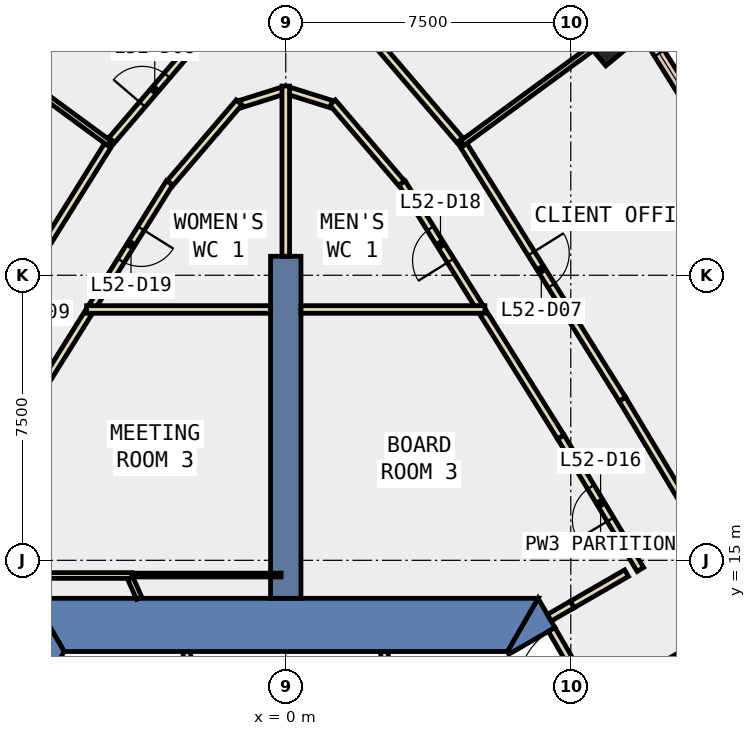
"""IFC4 building model, lengths in metres.
Left out: names, types, materials, properties, quantities, classifications, styles, units other than length and angle.
Written with IfcOpenShell. Run it as: python <this file> out.ifc"""

import sys

from ifc_helpers import new_model, si_unit, direction, frame, frame_2d, origin, origin_2d, place, context, subcontext, project, spatial, polyline, rectangle, outline, extrude, element, fill, save


model = new_model("IFC4")
c1 = context("Model", 3, precision=1e-05, world=origin(), true_north=direction((0.0, 1.0)))
c2 = subcontext(c1, "Body", "Model", "MODEL_VIEW")
j1 = project(units=[si_unit("LENGTHUNIT", "METRE"), si_unit("PLANEANGLEUNIT", "RADIAN")], contexts=[c1])
p1 = place(None, origin())
s1 = spatial("IfcSite", under=j1, at=p1, CompositionType="ELEMENT")
p2 = place(p1, origin())
s2 = spatial("IfcBuilding", under=s1, at=p2, CompositionType="ELEMENT")
p3 = place(p2, frame((0.0, 0.0, 231.8)))
s3 = spatial("IfcBuildingStorey", under=s2, at=p3, CompositionType="ELEMENT", Elevation=231.8)
p4 = place(p3, frame((8.642, 28.842, -0.4), z_axis=(0.0, 0.0, 1.0), x_axis=(-0.638660382845, 0.769488736359, 0.0)))
e1 = element("IfcColumn", 1, at=p4, inside=s3, PredefinedType="COLUMN", context=c2, shape_type="SweptSolid", body=[
    extrude(rectangle(XDim=1.0, YDim=1.4, at=origin_2d()), origin(), (0.0, 0.0, 1.0), 4.0),
])
p5 = place(p3, frame((0.0, 0.0, -0.4)))
e2 = element("IfcWall", 2, at=p5, inside=s3, PredefinedType="SHEAR", context=c2, shape_type="SweptSolid", body=[
    extrude(outline(polyline([(5.871, 12.53), (7.084, 13.23), (6.64, 14.0), (5.831, 12.6), (5.871, 12.53)])), origin(), (0.0, 0.0, 1.0), 4.0),
])
p6 = place(p3, frame((0.0, 0.0, -0.4)))
e3 = element("IfcWall", 3, at=p6, inside=s3, PredefinedType="SHEAR", context=c2, shape_type="SweptSolid", body=[
    extrude(outline(polyline([(6.64, 14.0), (-6.64, 14.0), (-5.831, 12.6), (5.831, 12.6), (6.64, 14.0)])), origin(), (0.0, 0.0, 1.0), 4.0),
])
p7 = place(p3, frame((0.0, 0.0, -0.4)))
e4 = element("IfcWall", 4, at=p7, inside=s3, PredefinedType="SHEAR", context=c2, shape_type="SweptSolid", body=[
    extrude(outline(polyline([(-11.834, 5.002), (-10.622, 4.302), (-5.831, 12.6), (-6.64, 14.0), (-11.834, 5.002)])), origin(), (0.0, 0.0, 1.0), 4.0),
])
p8 = place(p3, frame((0.0, 14.0, -0.4), z_axis=(0.0, 0.0, 1.0), x_axis=(0.0, 1.0, 0.0)))
e5 = element("IfcWall", 5, at=p8, inside=s3, PredefinedType="SHEAR", context=c2, shape_type="SweptSolid", body=[
    extrude(rectangle(XDim=9.0, YDim=0.8, at=frame_2d((4.5, 0.0))), origin(), (0.0, 0.0, 1.0), 4.0),
])
p9 = place(p3, frame((13.41, 22.614, 0.0), z_axis=(0.0, 0.0, 1.0), x_axis=(-0.530037467052, 0.847974223383, 0.0)))
e6 = element("IfcWall", 6, at=p9, inside=s3, PredefinedType="STANDARD", context=c2, shape_type="SweptSolid", body=[
    extrude(rectangle(XDim=7.405, YDim=0.3, at=frame_2d((3.702, 0.0))), origin(), (0.0, 0.0, 1.0), 3.6),
])
p10 = place(p9, frame((0.651, 0.0, 0.9)))
e7 = element("IfcOpeningElement", 7, at=p10, cuts=e6, PredefinedType="OPENING", context=c2, shape_type="SweptSolid", body=[
    extrude(rectangle(XDim=2.4, YDim=2.6, at=frame_2d((1.2, 1.3))), frame((0.0, 0.16, 0.0), z_axis=(0.0, -1.0, 0.0), x_axis=(1.0, 0.0, 0.0)), (0.0, 0.0, 1.0), 0.32),
])
p11 = place(p9, frame((4.354, 0.0, 0.9)))
e8 = element("IfcOpeningElement", 8, at=p11, cuts=e6, PredefinedType="OPENING", context=c2, shape_type="SweptSolid", body=[
    extrude(rectangle(XDim=2.4, YDim=2.6, at=frame_2d((1.2, 1.3))), frame((0.0, 0.16, 0.0), z_axis=(0.0, -1.0, 0.0), x_axis=(1.0, 0.0, 0.0)), (0.0, 0.0, 1.0), 0.32),
])
p12 = place(p3, frame((10.706, 12.666, 0.0), z_axis=(0.0, 0.0, 1.0), x_axis=(-0.865862892194, -0.50028137275, 0.0)))
e9 = element("IfcWall", 9, at=p12, inside=s3, PredefinedType="PARTITIONING", context=c2, shape_type="SweptSolid", body=[
    extrude(rectangle(XDim=2.155, YDim=0.2, at=frame_2d((1.078, 0.0))), origin(), (0.0, 0.0, 1.0), 3.6),
])
p13 = place(p3, frame((6.935, 13.488, 0.0), z_axis=(0.0, 0.0, 1.0), x_axis=(0.866022890907, 0.500004352405, 0.0)))
e10 = element("IfcWall", 10, at=p13, inside=s3, PredefinedType="PARTITIONING", context=c2, shape_type="SweptSolid", body=[
    extrude(rectangle(XDim=0.7, YDim=0.2, at=frame_2d((0.35, 0.0))), origin(), (0.0, 0.0, 1.0), 2.4),
])
p14 = place(p3, frame((9.332, 14.759, 0.0), z_axis=(0.0, 0.0, 1.0), x_axis=(-0.514989912292, 0.857196237881, 0.0)))
e11 = element("IfcWall", 11, at=p14, inside=s3, PredefinedType="PARTITIONING", context=c2, shape_type="SweptSolid", body=[
    extrude(rectangle(XDim=4.068, YDim=0.2, at=frame_2d((2.034, 0.0))), origin(), (0.0, 0.0, 1.0), 3.6),
])
p15 = place(p14, frame((1.534, 0.0, 0.0)))
e12 = element("IfcOpeningElement", 12, at=p15, cuts=e11, PredefinedType="OPENING", context=c2, shape_type="SweptSolid", body=[
    extrude(rectangle(XDim=1.0, YDim=2.1, at=frame_2d((0.5, 1.05))), frame((0.0, 0.11, 0.0), z_axis=(0.0, -1.0, 0.0), x_axis=(1.0, 0.0, 0.0)), (0.0, 0.0, 1.0), 0.22),
])
for number, where, z_axis, x_axis in (
    (13, (7.237, 18.246, 0.0), (0.0, 0.0, 1.0), (-0.53, 0.848, 0.0)),
    (14, (-5.193, 21.515, 0.0), (0.0, 0.0, 1.0), (-0.53, -0.848, 0.0)),
):
    element("IfcWall", number, at=place(p3, frame(where, z_axis=z_axis, x_axis=x_axis)), inside=s3, PredefinedType="PARTITIONING", context=c2, shape_type="SweptSolid", body=[
        extrude(rectangle(XDim=3.855, YDim=0.2, at=frame_2d((1.928, 0.0))), origin(), (0.0, 0.0, 1.0), 3.6),
    ])
p16 = place(p3, frame((5.087, 21.685, 0.0), z_axis=(0.0, 0.0, 1.0), x_axis=(-0.529998940003, 0.847998304005, 0.0)))
e15 = element("IfcWall", 15, at=p16, inside=s3, PredefinedType="PARTITIONING", context=c2, shape_type="SweptSolid", body=[
    extrude(rectangle(XDim=3.83, YDim=0.2, at=frame_2d((1.915, 0.0))), origin(), (0.0, 0.0, 1.0), 3.6),
])
p17 = place(p16, frame((1.416, 0.0, 0.0)))
e16 = element("IfcOpeningElement", 16, at=p17, cuts=e15, PredefinedType="OPENING", context=c2, shape_type="SweptSolid", body=[
    extrude(rectangle(XDim=1.0, YDim=2.1, at=frame_2d((0.5, 1.05))), frame((0.0, 0.11, 0.0), z_axis=(0.0, -1.0, 0.0), x_axis=(1.0, 0.0, 0.0)), (0.0, 0.0, 1.0), 0.22),
])
p18 = place(p3, frame((3.045, 24.925, 0.0), z_axis=(0.0, 0.0, 1.0), x_axis=(-0.650057725157, 0.759884829407, 0.0)))
e17 = element("IfcWall", 17, at=p18, inside=s3, PredefinedType="PARTITIONING", context=c2, shape_type="SweptSolid", body=[
    extrude(rectangle(XDim=2.796, YDim=0.2, at=frame_2d((1.398, 0.0))), origin(), (0.0, 0.0, 1.0), 3.6),
])
p19 = place(p3, frame((1.196, 27.004, 0.0), z_axis=(0.0, 0.0, 1.0), x_axis=(-0.954200976086, 0.29916633707, 0.0)))
e18 = element("IfcWall", 18, at=p19, inside=s3, PredefinedType="PARTITIONING", context=c2, shape_type="SweptSolid", body=[
    extrude(rectangle(XDim=1.154, YDim=0.2, at=frame_2d((0.577, 0.0))), origin(), (0.0, 0.0, 1.0), 3.6),
])
p20 = place(p3, frame((0.0, 27.379, 0.0), z_axis=(0.0, 0.0, 1.0), x_axis=(-0.954198830916, -0.299173179075, 0.0)))
e19 = element("IfcWall", 19, at=p20, inside=s3, PredefinedType="PARTITIONING", context=c2, shape_type="SweptSolid", body=[
    extrude(rectangle(XDim=1.253, YDim=0.2, at=frame_2d((0.627, 0.0))), origin(), (0.0, 0.0, 1.0), 3.6),
])
p21 = place(p3, frame((-1.227, 27.05, 0.0), z_axis=(0.0, 0.0, 1.0), x_axis=(-0.650057725157, -0.759884829407, 0.0)))
e20 = element("IfcWall", 20, at=p21, inside=s3, PredefinedType="PARTITIONING", context=c2, shape_type="SweptSolid", body=[
    extrude(rectangle(XDim=2.796, YDim=0.2, at=frame_2d((1.398, 0.0))), origin(), (0.0, 0.0, 1.0), 3.6),
])
p22 = place(p3, frame((-3.057, 24.933, 0.0), z_axis=(0.0, 0.0, 1.0), x_axis=(-0.529998940003, -0.847998304005, 0.0)))
e21 = element("IfcWall", 21, at=p22, inside=s3, PredefinedType="PARTITIONING", context=c2, shape_type="SweptSolid", body=[
    extrude(rectangle(XDim=3.83, YDim=0.2, at=frame_2d((1.915, 0.0))), origin(), (0.0, 0.0, 1.0), 3.6),
])
p23 = place(p22, frame((1.416, 0.0, 0.0)))
e22 = element("IfcOpeningElement", 22, at=p23, cuts=e21, PredefinedType="OPENING", context=c2, shape_type="SweptSolid", body=[
    extrude(rectangle(XDim=1.0, YDim=2.1, at=frame_2d((0.5, 1.05))), frame((0.0, 0.11, 0.0), z_axis=(0.0, -1.0, 0.0), x_axis=(1.0, 0.0, 0.0)), (0.0, 0.0, 1.0), 0.22),
])
p24 = place(p3, frame((4.593, 26.061, 0.0), z_axis=(0.0, 0.0, 1.0), x_axis=(0.530012579093, -0.847989779421, 0.0)))
e23 = element("IfcWall", 23, at=p24, inside=s3, PredefinedType="PARTITIONING", context=c2, shape_type="SweptSolid", body=[
    extrude(rectangle(XDim=8.045, YDim=0.2, at=frame_2d((4.022, 0.0))), origin(), (0.0, 0.0, 1.0), 3.6),
])
p25 = place(p24, frame((3.522, 0.0, 0.0)))
e24 = element("IfcOpeningElement", 24, at=p25, cuts=e23, PredefinedType="OPENING", context=c2, shape_type="SweptSolid", body=[
    extrude(rectangle(XDim=1.0, YDim=2.1, at=frame_2d((0.5, 1.05))), frame((0.0, 0.11, 0.0), z_axis=(0.0, -1.0, 0.0), x_axis=(1.0, 0.0, 0.0)), (0.0, 0.0, 1.0), 0.22),
])
p26 = place(p3, frame((8.857, 19.239, 0.0), z_axis=(0.0, 0.0, 1.0), x_axis=(0.514953174362, -0.857218308376, 0.0)))
e25 = element("IfcWall", 25, at=p26, inside=s3, PredefinedType="PARTITIONING", context=c2, shape_type="SweptSolid", body=[
    extrude(rectangle(XDim=4.002, YDim=0.2, at=frame_2d((2.001, 0.0))), origin(), (0.0, 0.0, 1.0), 3.6),
])
p27 = place(p3, frame((-4.581, 26.052, 0.0), z_axis=(0.0, 0.0, 1.0), x_axis=(0.650040973726, 0.759899159413, 0.0)))
e26 = element("IfcWall", 26, at=p27, inside=s3, PredefinedType="PARTITIONING", context=c2, shape_type="SweptSolid", body=[
    extrude(rectangle(XDim=3.485, YDim=0.2, at=frame_2d((1.742, 0.0))), origin(), (0.0, 0.0, 1.0), 3.6),
])
p28 = place(p27, frame((1.243, 0.0, 0.0)))
e27 = element("IfcOpeningElement", 27, at=p28, cuts=e26, PredefinedType="OPENING", context=c2, shape_type="SweptSolid", body=[
    extrude(rectangle(XDim=1.0, YDim=2.1, at=frame_2d((0.5, 1.05))), frame((0.0, 0.11, 0.0), z_axis=(0.0, -1.0, 0.0), x_axis=(1.0, 0.0, 0.0)), (0.0, 0.0, 1.0), 0.22),
])
p29 = place(p3, frame((2.316, 28.7, 0.0), z_axis=(0.0, 0.0, 1.0), x_axis=(0.650040973726, -0.759899159413, 0.0)))
e28 = element("IfcWall", 28, at=p29, inside=s3, PredefinedType="PARTITIONING", context=c2, shape_type="SweptSolid", body=[
    extrude(rectangle(XDim=3.485, YDim=0.2, at=frame_2d((1.742, 0.0))), origin(), (0.0, 0.0, 1.0), 3.6),
])
p30 = place(p3, frame((-8.896, 19.176, 0.0), z_axis=(0.0, 0.0, 1.0), x_axis=(0.529985425286, 0.848006750553, 0.0)))
e29 = element("IfcWall", 29, at=p30, inside=s3, PredefinedType="PARTITIONING", context=c2, shape_type="SweptSolid", body=[
    extrude(rectangle(XDim=8.119, YDim=0.2, at=frame_2d((4.06, 0.0))), origin(), (0.0, 0.0, 1.0), 3.6),
])
p31 = place(p30, frame((3.56, 0.0, 0.0)))
e30 = element("IfcOpeningElement", 30, at=p31, cuts=e29, PredefinedType="OPENING", context=c2, shape_type="SweptSolid", body=[
    extrude(rectangle(XDim=1.0, YDim=2.1, at=frame_2d((0.5, 1.05))), frame((0.0, 0.11, 0.0), z_axis=(0.0, -1.0, 0.0), x_axis=(1.0, 0.0, 0.0)), (0.0, 0.0, 1.0), 0.22),
])
p32 = place(p3, frame((-2.6, 10.8, 0.0), z_axis=(0.0, 0.0, 1.0), x_axis=(0.0, 1.0, 0.0)))
e31 = element("IfcWall", 31, at=p32, inside=s3, PredefinedType="PARTITIONING", context=c2, shape_type="SweptSolid", body=[
    extrude(rectangle(XDim=1.8, YDim=0.2, at=frame_2d((0.9, 0.0))), origin(), (0.0, 0.0, 1.0), 3.6),
])
p33 = place(p32, frame((0.4, 0.0, 0.0)))
e32 = element("IfcOpeningElement", 32, at=p33, cuts=e31, PredefinedType="OPENING", context=c2, shape_type="SweptSolid", body=[
    extrude(rectangle(XDim=0.9, YDim=2.1, at=frame_2d((0.45, 1.05))), frame((0.0, 0.11, 0.0), z_axis=(0.0, -1.0, 0.0), x_axis=(1.0, 0.0, 0.0)), (0.0, 0.0, 1.0), 0.22),
])
p34 = place(p3, frame((2.6, 12.6, 0.0), z_axis=(0.0, 0.0, 1.0), x_axis=(0.0, -1.0, 0.0)))
e33 = element("IfcWall", 33, at=p34, inside=s3, PredefinedType="PARTITIONING", context=c2, shape_type="SweptSolid", body=[
    extrude(rectangle(XDim=1.8, YDim=0.2, at=frame_2d((0.9, 0.0))), origin(), (0.0, 0.0, 1.0), 3.6),
])
p35 = place(p3, frame((-3.857, 14.0, 0.0), z_axis=(0.0, 0.0, 1.0), x_axis=(-0.403443407317, 0.915004599493, 0.0)))
e34 = element("IfcWall", 34, at=p35, inside=s3, PredefinedType="PARTITIONING", context=c2, shape_type="SweptSolid", body=[
    extrude(rectangle(XDim=0.58, YDim=0.15, at=frame_2d((0.29, 0.0))), origin(), (0.0, 0.0, 1.0), 3.6),
])
p36 = place(p3, frame((-4.047, 14.6, 0.0), z_axis=(0.0, 0.0, 1.0), x_axis=(-1.0, 0.0, 0.0)))
e35 = element("IfcWall", 35, at=p36, inside=s3, PredefinedType="PARTITIONING", context=c2, shape_type="SweptSolid", body=[
    extrude(rectangle(XDim=5.48, YDim=0.15, at=frame_2d((2.74, 0.0))), origin(), (0.0, 0.0, 1.0), 3.6),
])
p37 = place(p3, frame((-4.047, 14.612, 0.0), z_axis=(0.0, 0.0, 1.0), x_axis=(1.0, 0.0, 0.0)))
e36 = element("IfcWall", 36, at=p37, inside=s3, PredefinedType="PARTITIONING", context=c2, shape_type="SweptSolid", body=[
    extrude(rectangle(XDim=3.924, YDim=0.1, at=frame_2d((1.962, 0.0))), origin(), (0.0, 0.0, 1.0), 3.6),
])
for number, where, z_axis, x_axis in (
    (37, (0.4, 21.6, 0.0), (0.0, 0.0, 1.0), (1.0, 0.0, 0.0)),
    (38, (-5.24, 21.6, 0.0), (0.0, 0.0, 1.0), (1.0, 0.0, 0.0)),
):
    element("IfcWall", number, at=place(p3, frame(where, z_axis=z_axis, x_axis=x_axis)), inside=s3, PredefinedType="PARTITIONING", context=c2, shape_type="SweptSolid", body=[
        extrude(rectangle(XDim=4.84, YDim=0.2, at=frame_2d((2.42, 0.0))), origin(), (0.0, 0.0, 1.0), 3.6),
    ])
p38 = place(p3, frame((0.0, 23.0, 0.0), z_axis=(0.0, 0.0, 1.0), x_axis=(0.0, 1.0, 0.0)))
e39 = element("IfcWall", 39, at=p38, inside=s3, PredefinedType="PARTITIONING", context=c2, shape_type="SweptSolid", body=[
    extrude(rectangle(XDim=4.479, YDim=0.2, at=frame_2d((2.24, 0.0))), origin(), (0.0, 0.0, 1.0), 3.6),
])
for number, where, z_axis, x_axis in (
    (40, (4.646, 25.976, 0.0), (0.0, 0.0, 1.0), (0.806, 0.592, 0.0)),
    (41, (-4.646, 25.976, 0.0), (0.0, 0.0, 1.0), (-0.806, 0.592, 0.0)),
):
    element("IfcWall", number, at=place(p3, frame(where, z_axis=z_axis, x_axis=x_axis)), inside=s3, PredefinedType="PARTITIONING", context=c2, shape_type="SweptSolid", body=[
        extrude(rectangle(XDim=4.193, YDim=0.15, at=frame_2d((2.096, 0.0))), origin(), (0.0, 0.0, 1.0), 3.6),
    ])
p39 = place(p3, frame((7.997, 11.448, 0.0), z_axis=(0.0, 0.0, 1.0), x_axis=(-0.50002537861, 0.866010750942, 0.0)))
e42 = element("IfcWall", 42, at=p39, inside=s3, PredefinedType="PARTITIONING", context=c2, shape_type="SweptSolid", body=[
    extrude(rectangle(XDim=2.0, YDim=0.2, at=frame_2d((1.0, 0.0))), origin(), (0.0, 0.0, 1.0), 2.4),
])
p40 = place(p39, frame((0.19, 0.0, 0.0)))
e43 = element("IfcOpeningElement", 43, at=p40, cuts=e42, PredefinedType="OPENING", context=c2, shape_type="SweptSolid", body=[
    extrude(rectangle(XDim=1.8, YDim=2.1, at=frame_2d((0.9, 1.05))), frame((0.0, 0.11, 0.0), z_axis=(0.0, -1.0, 0.0), x_axis=(1.0, 0.0, 0.0)), (0.0, 0.0, 1.0), 0.22),
])
p41 = place(p3, frame((7.541, 13.838, 0.0), z_axis=(0.0, 0.0, 1.0), x_axis=(0.86593636949, 0.500154180222, 0.0)))
e44 = element("IfcWall", 44, at=p41, inside=s3, PredefinedType="PARTITIONING", context=c2, shape_type="SweptSolid", body=[
    extrude(rectangle(XDim=1.648, YDim=0.2, at=frame_2d((0.824, 0.0))), origin(), (0.0, 0.0, 1.0), 3.6),
])
p42 = place(p11, origin())
e45 = element("IfcWindow", 45, at=p42, inside=s3, PartitioningType="SINGLE_PANEL", PredefinedType="WINDOW", context=c2, shape_type="SweptSolid", body=[
    extrude(rectangle(XDim=2.4, YDim=2.6, at=frame_2d((1.2, 1.3))), frame((0.0, 0.03, 0.0), z_axis=(0.0, -1.0, 0.0), x_axis=(1.0, 0.0, 0.0)), (0.0, 0.0, 1.0), 0.06),
])
fill(e8, e45)
p43 = place(p25, origin())
e46 = element("IfcDoor", 46, at=p43, inside=s3, OperationType="SINGLE_SWING_LEFT", PredefinedType="DOOR", context=c2, shape_type="SweptSolid", body=[
    extrude(rectangle(XDim=1.0, YDim=2.1, at=frame_2d((0.5, 1.05))), frame((0.0, 0.025, 0.0), z_axis=(0.0, -1.0, 0.0), x_axis=(1.0, 0.0, 0.0)), (0.0, 0.0, 1.0), 0.05),
])
fill(e24, e46)
p44 = place(p28, origin())
e47 = element("IfcDoor", 47, at=p44, inside=s3, OperationType="SINGLE_SWING_LEFT", PredefinedType="DOOR", context=c2, shape_type="SweptSolid", body=[
    extrude(rectangle(XDim=1.0, YDim=2.1, at=frame_2d((0.5, 1.05))), frame((0.0, 0.025, 0.0), z_axis=(0.0, -1.0, 0.0), x_axis=(1.0, 0.0, 0.0)), (0.0, 0.0, 1.0), 0.05),
])
fill(e27, e47)
p45 = place(p15, origin())
e48 = element("IfcDoor", 48, at=p45, inside=s3, OperationType="SINGLE_SWING_LEFT", PredefinedType="DOOR", context=c2, shape_type="SweptSolid", body=[
    extrude(rectangle(XDim=1.0, YDim=2.1, at=frame_2d((0.5, 1.05))), frame((0.0, 0.025, 0.0), z_axis=(0.0, -1.0, 0.0), x_axis=(1.0, 0.0, 0.0)), (0.0, 0.0, 1.0), 0.05),
])
fill(e12, e48)
p46 = place(p17, origin())
e49 = element("IfcDoor", 49, at=p46, inside=s3, OperationType="SINGLE_SWING_LEFT", PredefinedType="DOOR", context=c2, shape_type="SweptSolid", body=[
    extrude(rectangle(XDim=1.0, YDim=2.1, at=frame_2d((0.5, 1.05))), frame((0.0, 0.025, 0.0), z_axis=(0.0, -1.0, 0.0), x_axis=(1.0, 0.0, 0.0)), (0.0, 0.0, 1.0), 0.05),
])
fill(e16, e49)
p47 = place(p23, origin())
e50 = element("IfcDoor", 50, at=p47, inside=s3, OperationType="SINGLE_SWING_LEFT", PredefinedType="DOOR", context=c2, shape_type="SweptSolid", body=[
    extrude(rectangle(XDim=1.0, YDim=2.1, at=frame_2d((0.5, 1.05))), frame((0.0, 0.025, 0.0), z_axis=(0.0, -1.0, 0.0), x_axis=(1.0, 0.0, 0.0)), (0.0, 0.0, 1.0), 0.05),
])
fill(e22, e50)
p48 = place(p40, origin())
e51 = element("IfcDoor", 51, at=p48, inside=s3, OperationType="DOUBLE_DOOR_SINGLE_SWING", PredefinedType="DOOR", context=c2, shape_type="SweptSolid", body=[
    extrude(rectangle(XDim=1.8, YDim=2.1, at=frame_2d((0.9, 1.05))), frame((0.0, 0.025, 0.0), z_axis=(0.0, -1.0, 0.0), x_axis=(1.0, 0.0, 0.0)), (0.0, 0.0, 1.0), 0.05),
])
fill(e43, e51)
save(model, sys.argv[1])
